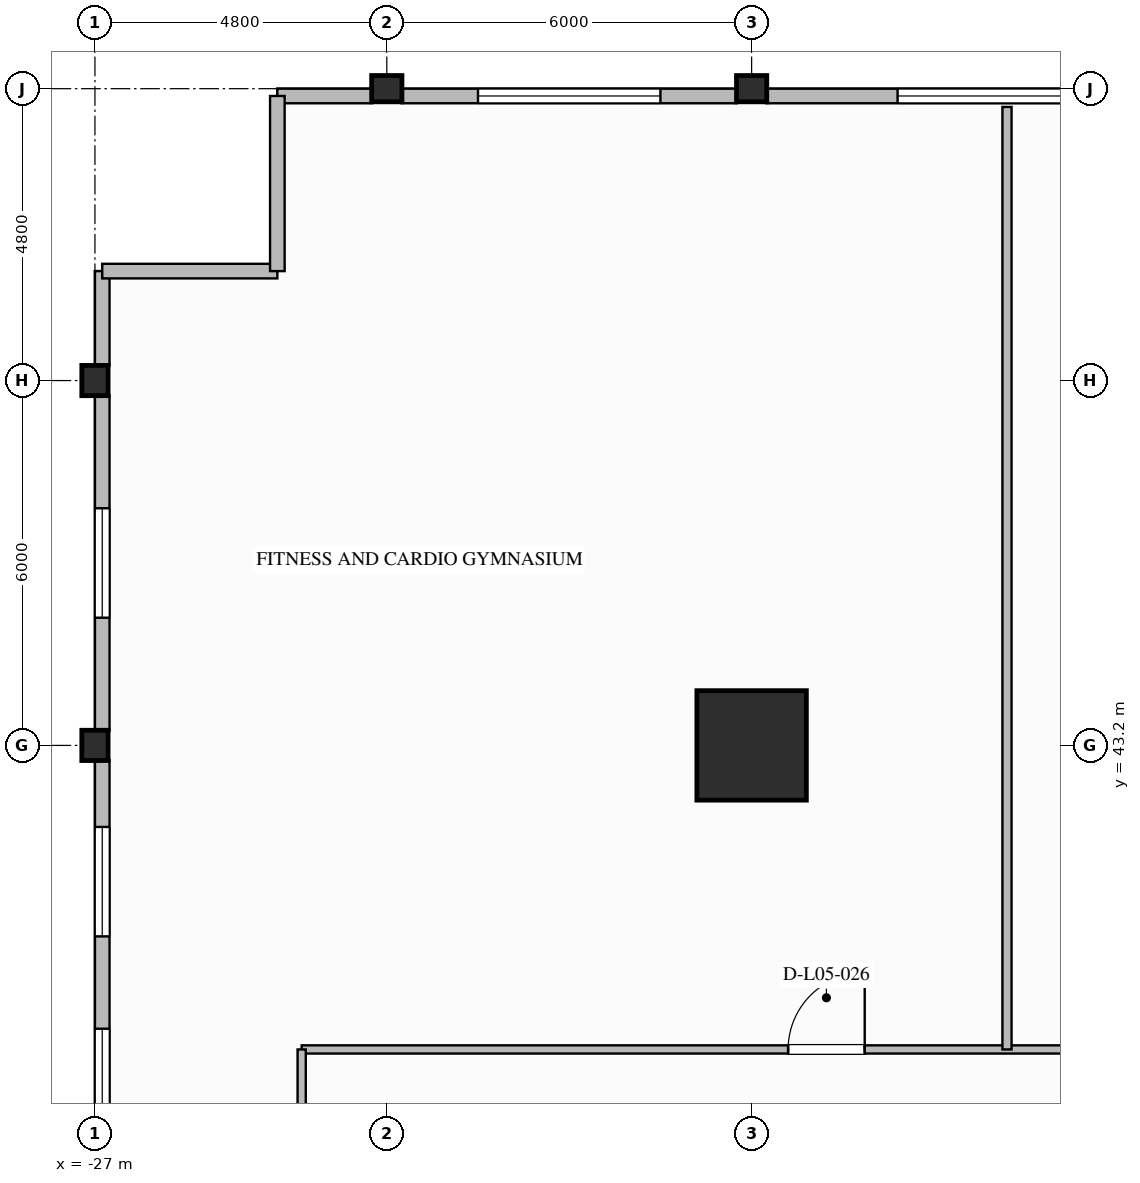
"""IFC4 building model, lengths in metres.
Left out: names, types, materials, properties, quantities, classifications, styles, units other than length and angle.
Written with IfcOpenShell. Run it as: python <this file> out.ifc"""

import sys

from ifc_helpers import new_model, si_unit, direction, frame, frame_2d, origin, origin_2d, place, context, subcontext, project, spatial, rectangle, i_section, extrude, element, fill, save


model = new_model("IFC4")
c1 = context("Model", 3, precision=1e-05, world=origin(), true_north=direction((0.0, 1.0)))
c2 = subcontext(c1, "Body", "Model", "MODEL_VIEW")
j1 = project(units=[si_unit("LENGTHUNIT", "METRE"), si_unit("PLANEANGLEUNIT", "RADIAN")], contexts=[c1])
p1 = place(None, origin())
s1 = spatial("IfcSite", under=j1, at=p1, CompositionType="ELEMENT")
p2 = place(p1, origin())
s2 = spatial("IfcBuilding", under=s1, at=p2, CompositionType="ELEMENT")
p3 = place(p2, frame((0.0, 0.0, 27.6)))
s3 = spatial("IfcBuildingStorey", under=s2, at=p3, CompositionType="ELEMENT", Elevation=27.6)
p4 = place(p3, frame((-16.2, 43.2, 0.0), z_axis=(0.0, 0.0, 1.0), x_axis=(1.0, 0.0, 0.0)))
e1 = element("IfcColumn", 1, at=p4, inside=s3, PredefinedType="COLUMN", context=c2, shape_type="SweptSolid", body=[
    extrude(rectangle(XDim=1.8, YDim=1.8, at=origin_2d()), origin(), (0.0, 0.0, 1.0), 5.6),
])
for number, where, z_axis, x_axis in (
    (2, (-27.0, 43.2, 0.0), (0.0, 0.0, 1.0), (1.0, 0.0, 0.0)),
    (3, (-27.0, 49.2, 0.0), (0.0, 0.0, 1.0), (1.0, 0.0, 0.0)),
    (4, (-22.2, 54.0, 0.0), (0.0, 0.0, 1.0), (0.0, 1.0, 0.0)),
    (5, (-16.2, 54.0, 0.0), (0.0, 0.0, 1.0), (0.0, 1.0, 0.0)),
):
    element("IfcColumn", number, at=place(p3, frame(where, z_axis=z_axis, x_axis=x_axis)), inside=s3, PredefinedType="COLUMN", context=c2, shape_type="SweptSolid", body=[
        extrude(i_section(OverallWidth=0.432, OverallDepth=0.498, WebThickness=0.056, FlangeThickness=0.089, FilletRadius=0.03, at=origin_2d()), origin(), (0.0, 0.0, 1.0), 5.32),
    ])
p5 = place(p3, frame((-26.88, 35.641, 0.0), z_axis=(0.0, 0.0, 1.0), x_axis=(0.0, 1.0, 0.0)))
e6 = element("IfcWall", 6, at=p5, inside=s3, PredefinedType="STANDARD", context=c2, shape_type="SweptSolid", body=[
    extrude(rectangle(XDim=7.318, YDim=0.24, at=frame_2d((3.659, 0.0))), origin(), (0.0, 0.0, 1.0), 3.52),
])
p6 = place(p5, frame((1.1, 0.0, 0.7)))
e7 = element("IfcOpeningElement", 7, at=p6, cuts=e6, PredefinedType="OPENING", context=c2, shape_type="SweptSolid", body=[
    extrude(rectangle(XDim=1.8, YDim=2.0, at=frame_2d((0.9, 1.0))), frame((0.0, 0.13, 0.0), z_axis=(0.0, -1.0, 0.0), x_axis=(1.0, 0.0, 0.0)), (0.0, 0.0, 1.0), 0.26),
])
p7 = place(p5, frame((4.418, 0.0, 0.7)))
e8 = element("IfcOpeningElement", 8, at=p7, cuts=e6, PredefinedType="OPENING", context=c2, shape_type="SweptSolid", body=[
    extrude(rectangle(XDim=1.8, YDim=2.0, at=frame_2d((0.9, 1.0))), frame((0.0, 0.13, 0.0), z_axis=(0.0, -1.0, 0.0), x_axis=(1.0, 0.0, 0.0)), (0.0, 0.0, 1.0), 0.26),
])
p8 = place(p3, frame((-26.88, 43.441, 0.0), z_axis=(0.0, 0.0, 1.0), x_axis=(0.0, 1.0, 0.0)))
e9 = element("IfcWall", 9, at=p8, inside=s3, PredefinedType="STANDARD", context=c2, shape_type="SweptSolid", body=[
    extrude(rectangle(XDim=5.518, YDim=0.24, at=frame_2d((2.759, 0.0))), origin(), (0.0, 0.0, 1.0), 4.625),
])
p9 = place(p8, frame((1.859, 0.0, 0.7)))
e10 = element("IfcOpeningElement", 10, at=p9, cuts=e9, PredefinedType="OPENING", context=c2, shape_type="SweptSolid", body=[
    extrude(rectangle(XDim=1.8, YDim=2.2, at=frame_2d((0.9, 1.1))), frame((0.0, 0.13, 0.0), z_axis=(0.0, -1.0, 0.0), x_axis=(1.0, 0.0, 0.0)), (0.0, 0.0, 1.0), 0.26),
])
for number, where, z_axis, x_axis in (
    (11, (-26.88, 49.441, 0.0), (0.0, 0.0, 1.0), (0.0, 1.0, 0.0)),
    (12, (-24.0, 53.88, 0.0), (0.0, 0.0, 1.0), (1.0, 0.0, 0.0)),
):
    element("IfcWall", number, at=place(p3, frame(where, z_axis=z_axis, x_axis=x_axis)), inside=s3, PredefinedType="STANDARD", context=c2, shape_type="SweptSolid", body=[
        extrude(rectangle(XDim=1.559, YDim=0.24, at=frame_2d((0.78, 0.0))), origin(), (0.0, 0.0, 1.0), 5.32),
    ])
p10 = place(p3, frame((-21.959, 53.88, 0.0), z_axis=(0.0, 0.0, 1.0), x_axis=(1.0, 0.0, 0.0)))
e13 = element("IfcWall", 13, at=p10, inside=s3, PredefinedType="STANDARD", context=c2, shape_type="SweptSolid", body=[
    extrude(rectangle(XDim=5.518, YDim=0.24, at=frame_2d((2.759, 0.0))), origin(), (0.0, 0.0, 1.0), 4.625),
])
p11 = place(p10, frame((1.259, 0.0, 0.65)))
e14 = element("IfcOpeningElement", 14, at=p11, cuts=e13, PredefinedType="OPENING", context=c2, shape_type="SweptSolid", body=[
    extrude(rectangle(XDim=3.0, YDim=2.2, at=frame_2d((1.5, 1.1))), frame((0.0, 0.13, 0.0), z_axis=(0.0, -1.0, 0.0), x_axis=(1.0, 0.0, 0.0)), (0.0, 0.0, 1.0), 0.26),
])
p12 = place(p3, frame((-15.959, 53.88, 0.0), z_axis=(0.0, 0.0, 1.0), x_axis=(1.0, 0.0, 0.0)))
e15 = element("IfcWall", 15, at=p12, inside=s3, PredefinedType="STANDARD", context=c2, shape_type="SweptSolid", body=[
    extrude(rectangle(XDim=7.318, YDim=0.24, at=frame_2d((3.659, 0.0))), origin(), (0.0, 0.0, 1.0), 3.52),
])
p13 = place(p12, frame((2.159, 0.0, 0.65)))
e16 = element("IfcOpeningElement", 16, at=p13, cuts=e15, PredefinedType="OPENING", context=c2, shape_type="SweptSolid", body=[
    extrude(rectangle(XDim=3.0, YDim=2.2, at=frame_2d((1.5, 1.1))), frame((0.0, 0.13, 0.0), z_axis=(0.0, -1.0, 0.0), x_axis=(1.0, 0.0, 0.0)), (0.0, 0.0, 1.0), 0.26),
])
for number, where, z_axis, x_axis in (
    (17, (-26.88, 51.0, 0.0), (0.0, 0.0, 1.0), (1.0, 0.0, 0.0)),
    (18, (-24.0, 51.0, 0.0), (0.0, 0.0, 1.0), (0.0, 1.0, 0.0)),
):
    element("IfcWall", number, at=place(p3, frame(where, z_axis=z_axis, x_axis=x_axis)), inside=s3, PredefinedType="STANDARD", context=c2, shape_type="SweptSolid", body=[
        extrude(rectangle(XDim=2.88, YDim=0.24, at=frame_2d((1.44, 0.0))), origin(), (0.0, 0.0, 1.0), 5.32),
    ])
p14 = place(p3, frame((-23.6, 38.2, 0.0), z_axis=(0.0, 0.0, 1.0), x_axis=(1.0, 0.0, 0.0)))
e19 = element("IfcWall", 19, at=p14, inside=s3, PredefinedType="PARTITIONING", context=c2, shape_type="SweptSolid", body=[
    extrude(rectangle(XDim=47.3, YDim=0.135, at=frame_2d((23.65, 0.0))), origin(), (0.0, 0.0, 1.0), 5.32),
])
p15 = place(p14, frame((39.2, 0.0, 0.0)))
e20 = element("IfcOpeningElement", 20, at=p15, cuts=e19, PredefinedType="OPENING", context=c2, shape_type="SweptSolid", body=[
    extrude(rectangle(XDim=0.98, YDim=2.1, at=frame_2d((0.49, 1.05))), frame((0.0, 0.077, 0.0), z_axis=(0.0, -1.0, 0.0), x_axis=(1.0, 0.0, 0.0)), (0.0, 0.0, 1.0), 0.155),
])
p16 = place(p14, frame((44.0, 0.0, 0.0)))
e21 = element("IfcOpeningElement", 21, at=p16, cuts=e19, PredefinedType="OPENING", context=c2, shape_type="SweptSolid", body=[
    extrude(rectangle(XDim=0.92, YDim=2.1, at=frame_2d((0.46, 1.05))), frame((0.0, 0.077, 0.0), z_axis=(0.0, -1.0, 0.0), x_axis=(1.0, 0.0, 0.0)), (0.0, 0.0, 1.0), 0.155),
])
p17 = place(p14, frame((8.0, 0.0, 0.0)))
e22 = element("IfcOpeningElement", 22, at=p17, cuts=e19, PredefinedType="OPENING", context=c2, shape_type="SweptSolid", body=[
    extrude(rectangle(XDim=1.26, YDim=2.2, at=frame_2d((0.63, 1.1))), frame((0.0, 0.077, 0.0), z_axis=(0.0, -1.0, 0.0), x_axis=(1.0, 0.0, 0.0)), (0.0, 0.0, 1.0), 0.155),
])
p18 = place(p14, frame((18.0, 0.0, 0.0)))
e23 = element("IfcOpeningElement", 23, at=p18, cuts=e19, PredefinedType="OPENING", context=c2, shape_type="SweptSolid", body=[
    extrude(rectangle(XDim=1.26, YDim=2.2, at=frame_2d((0.63, 1.1))), frame((0.0, 0.077, 0.0), z_axis=(0.0, -1.0, 0.0), x_axis=(1.0, 0.0, 0.0)), (0.0, 0.0, 1.0), 0.155),
])
p19 = place(p14, frame((30.0, 0.0, 0.0)))
e24 = element("IfcOpeningElement", 24, at=p19, cuts=e19, PredefinedType="OPENING", context=c2, shape_type="SweptSolid", body=[
    extrude(rectangle(XDim=1.02, YDim=2.15, at=frame_2d((0.51, 1.075))), frame((0.0, 0.077, 0.0), z_axis=(0.0, -1.0, 0.0), x_axis=(1.0, 0.0, 0.0)), (0.0, 0.0, 1.0), 0.155),
])
p20 = place(p3, frame((-23.6, 0.3, 0.0), z_axis=(0.0, 0.0, 1.0), x_axis=(0.0, 1.0, 0.0)))
e25 = element("IfcWall", 25, at=p20, inside=s3, PredefinedType="PARTITIONING", context=c2, shape_type="SweptSolid", body=[
    extrude(rectangle(XDim=37.9, YDim=0.135, at=frame_2d((18.95, 0.0))), origin(), (0.0, 0.0, 1.0), 5.32),
])
p21 = place(p20, frame((9.0, 0.0, 0.0)))
e26 = element("IfcOpeningElement", 26, at=p21, cuts=e25, PredefinedType="OPENING", context=c2, shape_type="SweptSolid", body=[
    extrude(rectangle(XDim=1.08, YDim=2.04, at=frame_2d((0.54, 1.02))), frame((0.0, 0.077, 0.0), z_axis=(0.0, -1.0, 0.0), x_axis=(1.0, 0.0, 0.0)), (0.0, 0.0, 1.0), 0.155),
])
p22 = place(p20, frame((24.0, 0.0, 0.0)))
e27 = element("IfcOpeningElement", 27, at=p22, cuts=e25, PredefinedType="OPENING", context=c2, shape_type="SweptSolid", body=[
    extrude(rectangle(XDim=1.08, YDim=2.04, at=frame_2d((0.54, 1.02))), frame((0.0, 0.077, 0.0), z_axis=(0.0, -1.0, 0.0), x_axis=(1.0, 0.0, 0.0)), (0.0, 0.0, 1.0), 0.155),
])
p23 = place(p3, frame((-12.0, 38.2, 0.0), z_axis=(0.0, 0.0, 1.0), x_axis=(0.0, 1.0, 0.0)))
e28 = element("IfcWall", 28, at=p23, inside=s3, PredefinedType="PARTITIONING", context=c2, shape_type="SweptSolid", body=[
    extrude(rectangle(XDim=15.5, YDim=0.15, at=frame_2d((7.75, 0.0))), origin(), (0.0, 0.0, 1.0), 5.32),
])
p24 = place(p6, origin())
e29 = element("IfcWindow", 29, at=p24, inside=s3, PartitioningType="SINGLE_PANEL", PredefinedType="WINDOW", context=c2, shape_type="SweptSolid", body=[
    extrude(rectangle(XDim=1.8, YDim=2.0, at=frame_2d((0.9, 1.0))), frame((0.0, 0.03, 0.0), z_axis=(0.0, -1.0, 0.0), x_axis=(1.0, 0.0, 0.0)), (0.0, 0.0, 1.0), 0.06),
])
fill(e7, e29)
p25 = place(p7, origin())
e30 = element("IfcWindow", 30, at=p25, inside=s3, PartitioningType="SINGLE_PANEL", PredefinedType="WINDOW", context=c2, shape_type="SweptSolid", body=[
    extrude(rectangle(XDim=1.8, YDim=2.0, at=frame_2d((0.9, 1.0))), frame((0.0, 0.03, 0.0), z_axis=(0.0, -1.0, 0.0), x_axis=(1.0, 0.0, 0.0)), (0.0, 0.0, 1.0), 0.06),
])
fill(e8, e30)
p26 = place(p9, origin())
e31 = element("IfcWindow", 31, at=p26, inside=s3, PartitioningType="SINGLE_PANEL", PredefinedType="WINDOW", context=c2, shape_type="SweptSolid", body=[
    extrude(rectangle(XDim=1.8, YDim=2.2, at=frame_2d((0.9, 1.1))), frame((0.0, 0.03, 0.0), z_axis=(0.0, -1.0, 0.0), x_axis=(1.0, 0.0, 0.0)), (0.0, 0.0, 1.0), 0.06),
])
fill(e10, e31)
p27 = place(p11, origin())
e32 = element("IfcWindow", 32, at=p27, inside=s3, PartitioningType="SINGLE_PANEL", PredefinedType="WINDOW", context=c2, shape_type="SweptSolid", body=[
    extrude(rectangle(XDim=3.0, YDim=2.2, at=frame_2d((1.5, 1.1))), frame((0.0, 0.03, 0.0), z_axis=(0.0, -1.0, 0.0), x_axis=(1.0, 0.0, 0.0)), (0.0, 0.0, 1.0), 0.06),
])
fill(e14, e32)
p28 = place(p13, origin())
e33 = element("IfcWindow", 33, at=p28, inside=s3, PartitioningType="SINGLE_PANEL", PredefinedType="WINDOW", context=c2, shape_type="SweptSolid", body=[
    extrude(rectangle(XDim=3.0, YDim=2.2, at=frame_2d((1.5, 1.1))), frame((0.0, 0.03, 0.0), z_axis=(0.0, -1.0, 0.0), x_axis=(1.0, 0.0, 0.0)), (0.0, 0.0, 1.0), 0.06),
])
fill(e16, e33)
p29 = place(p17, origin())
e34 = element("IfcDoor", 34, at=p29, inside=s3, OperationType="SINGLE_SWING_RIGHT", PredefinedType="DOOR", context=c2, shape_type="SweptSolid", body=[
    extrude(rectangle(XDim=1.26, YDim=2.2, at=frame_2d((0.63, 1.1))), frame((0.0, 0.025, 0.0), z_axis=(0.0, -1.0, 0.0), x_axis=(1.0, 0.0, 0.0)), (0.0, 0.0, 1.0), 0.05),
])
fill(e22, e34)
save(model, sys.argv[1])
